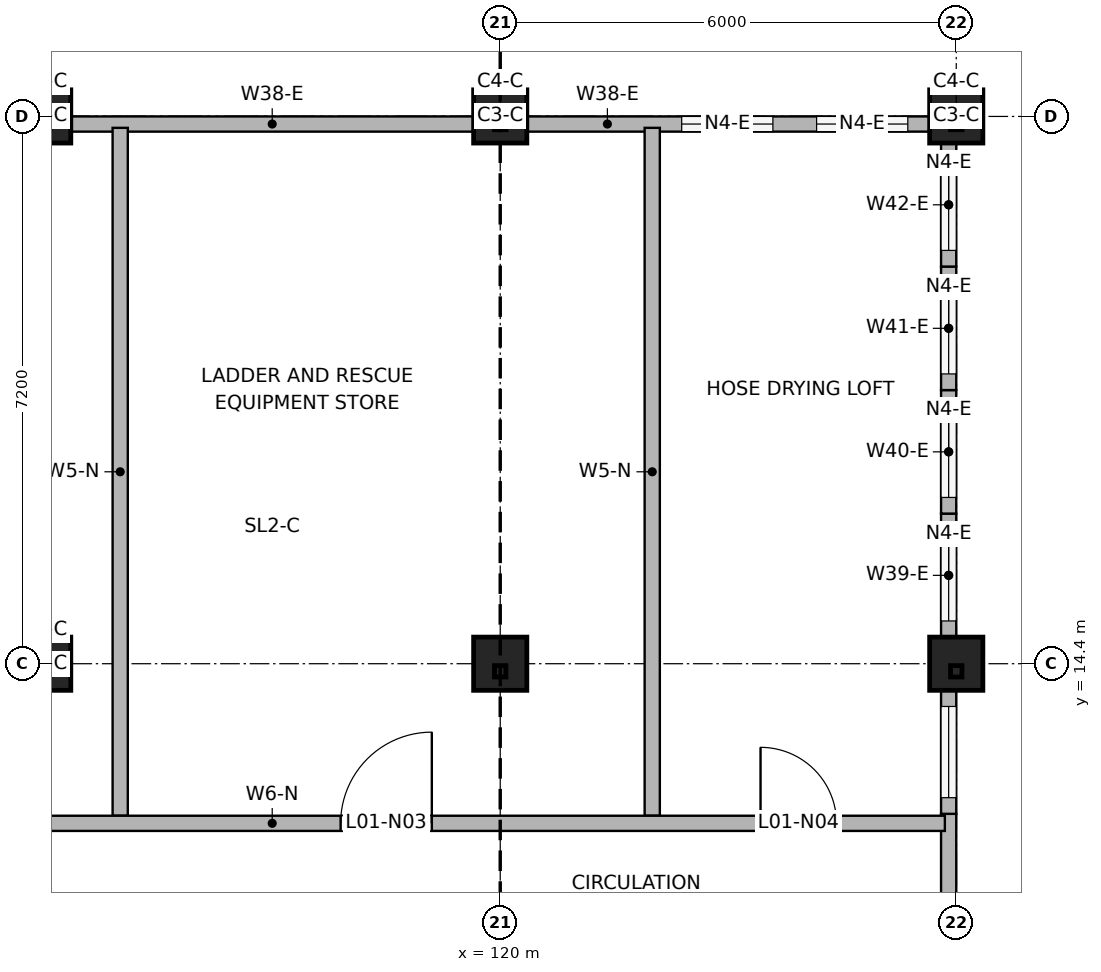
"""IFC4 building model, lengths in metres.
Left out: names, types, materials, properties, quantities, classifications, styles, units other than length and angle.
Written with IfcOpenShell. Run it as: python <this file> out.ifc"""

import sys

from ifc_helpers import new_model, si_unit, direction, frame, frame_2d, origin, origin_2d, place, context, subcontext, project, spatial, rectangle, hollow_rectangle, extrude, element, fill, save


model = new_model("IFC4")
c1 = context("Model", 3, precision=1e-05, world=origin(), true_north=direction((0.0, 1.0)))
c2 = subcontext(c1, "Body", "Model", "MODEL_VIEW")
j1 = project(units=[si_unit("LENGTHUNIT", "METRE"), si_unit("PLANEANGLEUNIT", "RADIAN")], contexts=[c1])
p1 = place(None, origin())
s1 = spatial("IfcSite", under=j1, at=p1, CompositionType="ELEMENT")
p2 = place(p1, origin())
s2 = spatial("IfcBuilding", under=s1, at=p2, CompositionType="ELEMENT")
p3 = place(p2, frame((0.0, 0.0, 4.2)))
s3 = spatial("IfcBuildingStorey", under=s2, at=p3, CompositionType="ELEMENT", Elevation=4.2)
for number, where, z_axis, x_axis in (
    (1, (114.0, 14.4, 0.0), (0.0, 0.0, 1.0), (1.0, 0.0, 0.0)),
    (2, (120.0, 14.4, 0.0), (0.0, 0.0, 1.0), (1.0, 0.0, 0.0)),
    (3, (126.0, 14.4, 0.0), (0.0, 0.0, 1.0), (1.0, 0.0, 0.0)),
    (4, (114.0, 21.6, 0.0), (0.0, 0.0, 1.0), (1.0, 0.0, 0.0)),
    (5, (120.0, 21.6, 0.0), (0.0, 0.0, 1.0), (1.0, 0.0, 0.0)),
    (6, (126.0, 21.6, 0.0), (0.0, 0.0, 1.0), (1.0, 0.0, 0.0)),
):
    element("IfcColumn", number, at=place(p3, frame(where, z_axis=z_axis, x_axis=x_axis)), inside=s3, PredefinedType="COLUMN", context=c2, shape_type="SweptSolid", body=[
        extrude(rectangle(XDim=0.7, YDim=0.7, at=origin_2d()), origin(), (0.0, 0.0, 1.0), 4.004),
    ])
for number, where, z_axis, x_axis in (
    (7, (120.0, 14.3, 4.004), (0.0, 0.0, 1.0), (1.0, 0.0, 0.0)),
    (8, (126.0, 14.3, 4.004), (0.0, 0.0, 1.0), (1.0, 0.0, 0.0)),
    (9, (120.0, 21.5, 4.004), (0.0, 0.0, 1.0), (1.0, 0.0, 0.0)),
    (10, (126.0, 21.5, 4.004), (0.0, 0.0, 1.0), (1.0, 0.0, 0.0)),
):
    element("IfcColumn", number, at=place(p3, frame(where, z_axis=z_axis, x_axis=x_axis)), inside=s3, PredefinedType="COLUMN", context=c2, shape_type="SweptSolid", body=[
        extrude(hollow_rectangle(XDim=0.15, YDim=0.15, WallThickness=0.008, at=origin_2d()), origin(), (0.0, 0.0, 1.0), 1.155),
    ])
p4 = place(p3, frame((114.35, 21.5, 0.0), z_axis=(0.0, 0.0, 1.0), x_axis=(1.0, 0.0, 0.0)))
e11 = element("IfcWall", 11, at=p4, inside=s3, PredefinedType="SOLIDWALL", context=c2, shape_type="SweptSolid", body=[
    extrude(rectangle(XDim=5.3, YDim=0.2, at=frame_2d((2.65, 0.0))), origin(), (0.0, 0.0, 1.0), 3.204),
])
p5 = place(p3, frame((120.35, 21.5, 0.0), z_axis=(0.0, 0.0, 1.0), x_axis=(1.0, 0.0, 0.0)))
e12 = element("IfcWall", 12, at=p5, inside=s3, PredefinedType="SOLIDWALL", context=c2, shape_type="SweptSolid", body=[
    extrude(rectangle(XDim=5.3, YDim=0.2, at=frame_2d((2.65, 0.0))), origin(), (0.0, 0.0, 1.0), 3.204),
])
p6 = place(p5, frame((2.038, 0.0, 1.2)))
e13 = element("IfcOpeningElement", 13, at=p6, cuts=e12, PredefinedType="OPENING", context=c2, shape_type="SweptSolid", body=[
    extrude(rectangle(XDim=1.2, YDim=1.4, at=frame_2d((0.6, 0.7))), frame((0.0, 0.11, 0.0), z_axis=(0.0, -1.0, 0.0), x_axis=(1.0, 0.0, 0.0)), (0.0, 0.0, 1.0), 0.22),
])
p7 = place(p5, frame((3.812, 0.0, 1.2)))
e14 = element("IfcOpeningElement", 14, at=p7, cuts=e12, PredefinedType="OPENING", context=c2, shape_type="SweptSolid", body=[
    extrude(rectangle(XDim=1.2, YDim=1.4, at=frame_2d((0.6, 0.7))), frame((0.0, 0.11, 0.0), z_axis=(0.0, -1.0, 0.0), x_axis=(1.0, 0.0, 0.0)), (0.0, 0.0, 1.0), 0.22),
])
p8 = place(p3, frame((125.9, 10.8, 0.0), z_axis=(0.0, 0.0, 1.0), x_axis=(0.0, 1.0, 0.0)))
e15 = element("IfcWall", 15, at=p8, inside=s3, PredefinedType="SOLIDWALL", context=c2, shape_type="SweptSolid", body=[
    extrude(rectangle(XDim=1.625, YDim=0.2, at=frame_2d((0.812, 0.0))), origin(), (0.0, 0.0, 1.0), 4.691),
])
p9 = place(p3, frame((125.9, 12.425, 0.0), z_axis=(0.0, 0.0, 1.0), x_axis=(0.0, 1.0, 0.0)))
e16 = element("IfcWall", 16, at=p9, inside=s3, PredefinedType="SOLIDWALL", context=c2, shape_type="SweptSolid", body=[
    extrude(rectangle(XDim=1.625, YDim=0.2, at=frame_2d((0.812, 0.0))), origin(), (0.0, 0.0, 1.0), 5.007),
])
p10 = place(p9, frame((0.212, 0.0, 1.2)))
e17 = element("IfcOpeningElement", 17, at=p10, cuts=e16, PredefinedType="OPENING", context=c2, shape_type="SweptSolid", body=[
    extrude(rectangle(XDim=1.2, YDim=1.4, at=frame_2d((0.6, 0.7))), frame((0.0, 0.11, 0.0), z_axis=(0.0, -1.0, 0.0), x_axis=(1.0, 0.0, 0.0)), (0.0, 0.0, 1.0), 0.22),
])
p11 = place(p3, frame((125.9, 14.75, 0.0), z_axis=(0.0, 0.0, 1.0), x_axis=(0.0, 1.0, 0.0)))
e18 = element("IfcWall", 18, at=p11, inside=s3, PredefinedType="SOLIDWALL", context=c2, shape_type="SweptSolid", body=[
    extrude(rectangle(XDim=1.625, YDim=0.2, at=frame_2d((0.812, 0.0))), origin(), (0.0, 0.0, 1.0), 4.059),
])
p12 = place(p11, frame((0.212, 0.0, 1.2)))
e19 = element("IfcOpeningElement", 19, at=p12, cuts=e18, PredefinedType="OPENING", context=c2, shape_type="SweptSolid", body=[
    extrude(rectangle(XDim=1.2, YDim=1.4, at=frame_2d((0.6, 0.7))), frame((0.0, 0.11, 0.0), z_axis=(0.0, -1.0, 0.0), x_axis=(1.0, 0.0, 0.0)), (0.0, 0.0, 1.0), 0.22),
])
p13 = place(p3, frame((125.9, 16.375, 0.0), z_axis=(0.0, 0.0, 1.0), x_axis=(0.0, 1.0, 0.0)))
e20 = element("IfcWall", 20, at=p13, inside=s3, PredefinedType="SOLIDWALL", context=c2, shape_type="SweptSolid", body=[
    extrude(rectangle(XDim=1.625, YDim=0.2, at=frame_2d((0.812, 0.0))), origin(), (0.0, 0.0, 1.0), 4.375),
])
p14 = place(p13, frame((0.212, 0.0, 1.2)))
e21 = element("IfcOpeningElement", 21, at=p14, cuts=e20, PredefinedType="OPENING", context=c2, shape_type="SweptSolid", body=[
    extrude(rectangle(XDim=1.2, YDim=1.4, at=frame_2d((0.6, 0.7))), frame((0.0, 0.11, 0.0), z_axis=(0.0, -1.0, 0.0), x_axis=(1.0, 0.0, 0.0)), (0.0, 0.0, 1.0), 0.22),
])
p15 = place(p3, frame((125.9, 18.0, 0.0), z_axis=(0.0, 0.0, 1.0), x_axis=(0.0, 1.0, 0.0)))
e22 = element("IfcWall", 22, at=p15, inside=s3, PredefinedType="SOLIDWALL", context=c2, shape_type="SweptSolid", body=[
    extrude(rectangle(XDim=1.625, YDim=0.2, at=frame_2d((0.812, 0.0))), origin(), (0.0, 0.0, 1.0), 4.691),
])
p16 = place(p15, frame((0.212, 0.0, 1.2)))
e23 = element("IfcOpeningElement", 23, at=p16, cuts=e22, PredefinedType="OPENING", context=c2, shape_type="SweptSolid", body=[
    extrude(rectangle(XDim=1.2, YDim=1.4, at=frame_2d((0.6, 0.7))), frame((0.0, 0.11, 0.0), z_axis=(0.0, -1.0, 0.0), x_axis=(1.0, 0.0, 0.0)), (0.0, 0.0, 1.0), 0.22),
])
p17 = place(p3, frame((125.9, 19.625, 0.0), z_axis=(0.0, 0.0, 1.0), x_axis=(0.0, 1.0, 0.0)))
e24 = element("IfcWall", 24, at=p17, inside=s3, PredefinedType="SOLIDWALL", context=c2, shape_type="SweptSolid", body=[
    extrude(rectangle(XDim=1.625, YDim=0.2, at=frame_2d((0.812, 0.0))), origin(), (0.0, 0.0, 1.0), 5.007),
])
p18 = place(p17, frame((0.212, 0.0, 1.2)))
e25 = element("IfcOpeningElement", 25, at=p18, cuts=e24, PredefinedType="OPENING", context=c2, shape_type="SweptSolid", body=[
    extrude(rectangle(XDim=1.2, YDim=1.4, at=frame_2d((0.6, 0.7))), frame((0.0, 0.11, 0.0), z_axis=(0.0, -1.0, 0.0), x_axis=(1.0, 0.0, 0.0)), (0.0, 0.0, 1.0), 0.22),
])
for number, where, z_axis, x_axis in (
    (26, (115.0, 12.4, 0.0), (0.0, 0.0, 1.0), (0.0, 1.0, 0.0)),
    (27, (122.0, 12.4, 0.0), (0.0, 0.0, 1.0), (0.0, 1.0, 0.0)),
):
    element("IfcWall", number, at=place(p3, frame(where, z_axis=z_axis, x_axis=x_axis)), inside=s3, PredefinedType="PARTITIONING", context=c2, shape_type="SweptSolid", body=[
        extrude(rectangle(XDim=9.05, YDim=0.2, at=frame_2d((4.525, 0.0))), origin(), (0.0, 0.0, 1.0), 3.204),
    ])
p19 = place(p3, frame((108.15, 12.3, 0.0), z_axis=(0.0, 0.0, 1.0), x_axis=(1.0, 0.0, 0.0)))
e28 = element("IfcWall", 28, at=p19, inside=s3, PredefinedType="PARTITIONING", context=c2, shape_type="SweptSolid", body=[
    extrude(rectangle(XDim=17.7, YDim=0.2, at=frame_2d((8.85, 0.0))), origin(), (0.0, 0.0, 1.0), 3.95),
])
p20 = place(p19, frame((2.825, 0.0, 0.0)))
e29 = element("IfcOpeningElement", 29, at=p20, cuts=e28, PredefinedType="OPENING", context=c2, shape_type="SweptSolid", body=[
    extrude(rectangle(XDim=1.2, YDim=2.1, at=frame_2d((0.6, 1.05))), frame((0.0, 0.11, 0.0), z_axis=(0.0, -1.0, 0.0), x_axis=(1.0, 0.0, 0.0)), (0.0, 0.0, 1.0), 0.22),
])
p21 = place(p19, frame((9.75, 0.0, 0.0)))
e30 = element("IfcOpeningElement", 30, at=p21, cuts=e28, PredefinedType="OPENING", context=c2, shape_type="SweptSolid", body=[
    extrude(rectangle(XDim=1.2, YDim=2.1, at=frame_2d((0.6, 1.05))), frame((0.0, 0.11, 0.0), z_axis=(0.0, -1.0, 0.0), x_axis=(1.0, 0.0, 0.0)), (0.0, 0.0, 1.0), 0.22),
])
p22 = place(p19, frame((15.275, 0.0, 0.0)))
e31 = element("IfcOpeningElement", 31, at=p22, cuts=e28, PredefinedType="OPENING", context=c2, shape_type="SweptSolid", body=[
    extrude(rectangle(XDim=1.0, YDim=2.1, at=frame_2d((0.5, 1.05))), frame((0.0, 0.11, 0.0), z_axis=(0.0, -1.0, 0.0), x_axis=(1.0, 0.0, 0.0)), (0.0, 0.0, 1.0), 0.22),
])
p23 = place(p6, origin())
e32 = element("IfcWindow", 32, at=p23, inside=s3, PartitioningType="SINGLE_PANEL", PredefinedType="WINDOW", context=c2, shape_type="SweptSolid", body=[
    extrude(rectangle(XDim=1.2, YDim=1.4, at=frame_2d((0.6, 0.7))), frame((0.0, 0.03, 0.0), z_axis=(0.0, -1.0, 0.0), x_axis=(1.0, 0.0, 0.0)), (0.0, 0.0, 1.0), 0.06),
])
fill(e13, e32)
p24 = place(p7, origin())
e33 = element("IfcWindow", 33, at=p24, inside=s3, PartitioningType="SINGLE_PANEL", PredefinedType="WINDOW", context=c2, shape_type="SweptSolid", body=[
    extrude(rectangle(XDim=1.2, YDim=1.4, at=frame_2d((0.6, 0.7))), frame((0.0, 0.03, 0.0), z_axis=(0.0, -1.0, 0.0), x_axis=(1.0, 0.0, 0.0)), (0.0, 0.0, 1.0), 0.06),
])
fill(e14, e33)
p25 = place(p10, origin())
e34 = element("IfcWindow", 34, at=p25, inside=s3, PartitioningType="SINGLE_PANEL", PredefinedType="WINDOW", context=c2, shape_type="SweptSolid", body=[
    extrude(rectangle(XDim=1.2, YDim=1.4, at=frame_2d((0.6, 0.7))), frame((0.0, 0.03, 0.0), z_axis=(0.0, -1.0, 0.0), x_axis=(1.0, 0.0, 0.0)), (0.0, 0.0, 1.0), 0.06),
])
fill(e17, e34)
p26 = place(p12, origin())
e35 = element("IfcWindow", 35, at=p26, inside=s3, PartitioningType="SINGLE_PANEL", PredefinedType="WINDOW", context=c2, shape_type="SweptSolid", body=[
    extrude(rectangle(XDim=1.2, YDim=1.4, at=frame_2d((0.6, 0.7))), frame((0.0, 0.03, 0.0), z_axis=(0.0, -1.0, 0.0), x_axis=(1.0, 0.0, 0.0)), (0.0, 0.0, 1.0), 0.06),
])
fill(e19, e35)
p27 = place(p14, origin())
e36 = element("IfcWindow", 36, at=p27, inside=s3, PartitioningType="SINGLE_PANEL", PredefinedType="WINDOW", context=c2, shape_type="SweptSolid", body=[
    extrude(rectangle(XDim=1.2, YDim=1.4, at=frame_2d((0.6, 0.7))), frame((0.0, 0.03, 0.0), z_axis=(0.0, -1.0, 0.0), x_axis=(1.0, 0.0, 0.0)), (0.0, 0.0, 1.0), 0.06),
])
fill(e21, e36)
p28 = place(p16, origin())
e37 = element("IfcWindow", 37, at=p28, inside=s3, PartitioningType="SINGLE_PANEL", PredefinedType="WINDOW", context=c2, shape_type="SweptSolid", body=[
    extrude(rectangle(XDim=1.2, YDim=1.4, at=frame_2d((0.6, 0.7))), frame((0.0, 0.03, 0.0), z_axis=(0.0, -1.0, 0.0), x_axis=(1.0, 0.0, 0.0)), (0.0, 0.0, 1.0), 0.06),
])
fill(e23, e37)
p29 = place(p18, origin())
e38 = element("IfcWindow", 38, at=p29, inside=s3, PartitioningType="SINGLE_PANEL", PredefinedType="WINDOW", context=c2, shape_type="SweptSolid", body=[
    extrude(rectangle(XDim=1.2, YDim=1.4, at=frame_2d((0.6, 0.7))), frame((0.0, 0.03, 0.0), z_axis=(0.0, -1.0, 0.0), x_axis=(1.0, 0.0, 0.0)), (0.0, 0.0, 1.0), 0.06),
])
fill(e25, e38)
p30 = place(p21, origin())
e39 = element("IfcDoor", 39, at=p30, inside=s3, OperationType="SINGLE_SWING_RIGHT", PredefinedType="DOOR", context=c2, shape_type="SweptSolid", body=[
    extrude(rectangle(XDim=1.2, YDim=2.1, at=frame_2d((0.6, 1.05))), frame((0.0, 0.025, 0.0), z_axis=(0.0, -1.0, 0.0), x_axis=(1.0, 0.0, 0.0)), (0.0, 0.0, 1.0), 0.05),
])
fill(e30, e39)
p31 = place(p22, origin())
e40 = element("IfcDoor", 40, at=p31, inside=s3, OperationType="SINGLE_SWING_LEFT", PredefinedType="DOOR", context=c2, shape_type="SweptSolid", body=[
    extrude(rectangle(XDim=1.0, YDim=2.1, at=frame_2d((0.5, 1.05))), frame((0.0, 0.025, 0.0), z_axis=(0.0, -1.0, 0.0), x_axis=(1.0, 0.0, 0.0)), (0.0, 0.0, 1.0), 0.05),
])
fill(e31, e40)
save(model, sys.argv[1])
